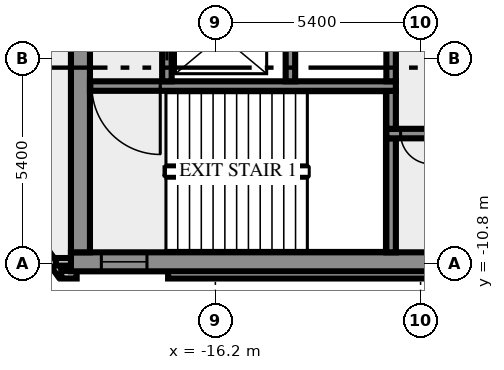
"""IFC4 building model, lengths in metres.
Left out: names, types, materials, properties, quantities, classifications, styles, units other than length and angle.
Written with IfcOpenShell. Run it as: python <this file> out.ifc"""

import sys

from ifc_helpers import new_model, si_unit, direction, frame, frame_2d, origin, place, context, subcontext, project, spatial, rectangle, extrude, element, fill, save


model = new_model("IFC4")
c1 = context("Model", 3, precision=1e-05, world=origin(), true_north=direction((0.0, 1.0)))
c2 = subcontext(c1, "Body", "Model", "MODEL_VIEW")
j1 = project(units=[si_unit("LENGTHUNIT", "METRE"), si_unit("PLANEANGLEUNIT", "RADIAN")], contexts=[c1])
p1 = place(None, origin())
s1 = spatial("IfcSite", under=j1, at=p1, CompositionType="ELEMENT")
p2 = place(p1, origin())
s2 = spatial("IfcBuilding", under=s1, at=p2, CompositionType="ELEMENT")
p3 = place(p2, frame((0.0, 0.0, 285.0)))
s3 = spatial("IfcBuildingStorey", under=s2, at=p3, CompositionType="ELEMENT", Elevation=285.0)
p4 = place(p3, frame((-21.833, -8.909, 0.0), z_axis=(0.0, 0.0, 1.0), x_axis=(0.587766567315, -0.809030569476, 0.0)))
e1 = element("IfcWall", 1, at=p4, inside=s3, PredefinedType="SOLIDWALL", context=c2, shape_type="SweptSolid", body=[
    extrude(rectangle(XDim=2.688, YDim=0.2, at=frame_2d((1.344, 0.0))), origin(), (0.0, 0.0, 1.0), 3.65),
])
p5 = place(p3, frame((-20.256, -11.088, 0.0), z_axis=(0.0, 0.0, 1.0), x_axis=(1.0, 0.0, 0.0)))
e2 = element("IfcWall", 2, at=p5, inside=s3, PredefinedType="SOLIDWALL", context=c2, shape_type="SweptSolid", body=[
    extrude(rectangle(XDim=0.406, YDim=0.2, at=frame_2d((0.203, 0.0))), origin(), (0.0, 0.0, 1.0), 3.65),
])
p6 = place(p3, frame((-17.444, -11.088, 0.0), z_axis=(0.0, 0.0, 1.0), x_axis=(1.0, 0.0, 0.0)))
e3 = element("IfcWall", 3, at=p6, inside=s3, PredefinedType="SOLIDWALL", context=c2, shape_type="SweptSolid", body=[
    extrude(rectangle(XDim=34.888, YDim=0.2, at=frame_2d((17.444, 0.0))), origin(), (0.0, 0.0, 1.0), 3.65),
])
p7 = place(p3, frame((-19.98, -10.75, 0.0), z_axis=(0.0, 0.0, 1.0), x_axis=(-1.0, 0.0, 0.0)))
e4 = element("IfcWall", 4, at=p7, inside=s3, PredefinedType="SOLIDWALL", context=c2, shape_type="SweptSolid", body=[
    extrude(rectangle(XDim=0.417, YDim=0.2, at=frame_2d((0.208, 0.0))), origin(), (0.0, 0.0, 1.0), 3.65),
])
p8 = place(p3, frame((-20.0, -10.75, 0.0), z_axis=(0.0, 0.0, 1.0), x_axis=(1.0, 0.0, 0.0)))
e5 = element("IfcWall", 5, at=p8, inside=s3, PredefinedType="SHEAR", context=c2, shape_type="SweptSolid", body=[
    extrude(rectangle(XDim=40.0, YDim=0.5, at=frame_2d((20.0, 0.0))), origin(), (0.0, 0.0, 1.0), 3.65),
])
p9 = place(p8, frame((0.8, 0.0, 1.0)))
e6 = element("IfcOpeningElement", 6, at=p9, cuts=e5, PredefinedType="OPENING", context=c2, shape_type="SweptSolid", body=[
    extrude(rectangle(XDim=1.2, YDim=1.2, at=frame_2d((0.6, 0.6))), frame((0.0, 0.26, 0.0), z_axis=(0.0, -1.0, 0.0), x_axis=(1.0, 0.0, 0.0)), (0.0, 0.0, 1.0), 0.52),
])
p10 = place(p8, frame((38.0, 0.0, 1.0)))
e7 = element("IfcOpeningElement", 7, at=p10, cuts=e5, PredefinedType="OPENING", context=c2, shape_type="SweptSolid", body=[
    extrude(rectangle(XDim=1.2, YDim=1.2, at=frame_2d((0.6, 0.6))), frame((0.0, 0.26, 0.0), z_axis=(0.0, -1.0, 0.0), x_axis=(1.0, 0.0, 0.0)), (0.0, 0.0, 1.0), 0.52),
])
p11 = place(p3, frame((-19.75, -10.5, 0.0), z_axis=(0.0, 0.0, 1.0), x_axis=(0.0, 1.0, 0.0)))
e8 = element("IfcWall", 8, at=p11, inside=s3, PredefinedType="SHEAR", context=c2, shape_type="SweptSolid", body=[
    extrude(rectangle(XDim=8.8, YDim=0.5, at=frame_2d((4.4, 0.0))), origin(), (0.0, 0.0, 1.0), 3.65),
])
p12 = place(p3, frame((-11.575, -10.5, 0.0), z_axis=(0.0, 0.0, 1.0), x_axis=(0.0, 1.0, 0.0)))
e9 = element("IfcWall", 9, at=p12, inside=s3, PredefinedType="SHEAR", context=c2, shape_type="SweptSolid", body=[
    extrude(rectangle(XDim=3.0, YDim=0.25, at=frame_2d((1.5, 0.0))), origin(), (0.0, 0.0, 1.0), 3.65),
])
p13 = place(p3, frame((11.7, -7.375, 0.0), z_axis=(0.0, 0.0, 1.0), x_axis=(-1.0, 0.0, 0.0)))
e10 = element("IfcWall", 10, at=p13, inside=s3, PredefinedType="SHEAR", context=c2, shape_type="SweptSolid", body=[
    extrude(rectangle(XDim=23.4, YDim=0.25, at=frame_2d((11.7, 0.0))), origin(), (0.0, 0.0, 1.0), 3.65),
])
p14 = place(p13, frame((22.225, 0.0, 0.0)))
e11 = element("IfcOpeningElement", 11, at=p14, cuts=e10, PredefinedType="OPENING", context=c2, shape_type="SweptSolid", body=[
    extrude(rectangle(XDim=0.8, YDim=2.1, at=frame_2d((0.4, 1.05))), frame((0.0, 0.135, 0.0), z_axis=(0.0, -1.0, 0.0), x_axis=(1.0, 0.0, 0.0)), (0.0, 0.0, 1.0), 0.27),
])
p15 = place(p13, frame((20.2, 0.0, 0.0)))
e12 = element("IfcOpeningElement", 12, at=p15, cuts=e10, PredefinedType="OPENING", context=c2, shape_type="SweptSolid", body=[
    extrude(rectangle(XDim=1.1, YDim=2.1, at=frame_2d((0.55, 1.05))), frame((0.0, 0.135, 0.0), z_axis=(0.0, -1.0, 0.0), x_axis=(1.0, 0.0, 0.0)), (0.0, 0.0, 1.0), 0.27),
])
p16 = place(p13, frame((17.7, 0.0, 0.0)))
e13 = element("IfcOpeningElement", 13, at=p16, cuts=e10, PredefinedType="OPENING", context=c2, shape_type="SweptSolid", body=[
    extrude(rectangle(XDim=1.1, YDim=2.1, at=frame_2d((0.55, 1.05))), frame((0.0, 0.135, 0.0), z_axis=(0.0, -1.0, 0.0), x_axis=(1.0, 0.0, 0.0)), (0.0, 0.0, 1.0), 0.27),
])
p17 = place(p13, frame((15.975, 0.0, 0.0)))
e14 = element("IfcOpeningElement", 14, at=p17, cuts=e10, PredefinedType="OPENING", context=c2, shape_type="SweptSolid", body=[
    extrude(rectangle(XDim=0.8, YDim=2.1, at=frame_2d((0.4, 1.05))), frame((0.0, 0.135, 0.0), z_axis=(0.0, -1.0, 0.0), x_axis=(1.0, 0.0, 0.0)), (0.0, 0.0, 1.0), 0.27),
])
p18 = place(p13, frame((14.5, 0.0, 0.0)))
e15 = element("IfcOpeningElement", 15, at=p18, cuts=e10, PredefinedType="OPENING", context=c2, shape_type="SweptSolid", body=[
    extrude(rectangle(XDim=0.9, YDim=2.1, at=frame_2d((0.45, 1.05))), frame((0.0, 0.135, 0.0), z_axis=(0.0, -1.0, 0.0), x_axis=(1.0, 0.0, 0.0)), (0.0, 0.0, 1.0), 0.27),
])
p19 = place(p13, frame((12.95, 0.0, 0.0)))
e16 = element("IfcOpeningElement", 16, at=p19, cuts=e10, PredefinedType="OPENING", context=c2, shape_type="SweptSolid", body=[
    extrude(rectangle(XDim=0.9, YDim=2.1, at=frame_2d((0.45, 1.05))), frame((0.0, 0.135, 0.0), z_axis=(0.0, -1.0, 0.0), x_axis=(1.0, 0.0, 0.0)), (0.0, 0.0, 1.0), 0.27),
])
p20 = place(p13, frame((11.475, 0.0, 0.0)))
e17 = element("IfcOpeningElement", 17, at=p20, cuts=e10, PredefinedType="OPENING", context=c2, shape_type="SweptSolid", body=[
    extrude(rectangle(XDim=0.9, YDim=2.1, at=frame_2d((0.45, 1.05))), frame((0.0, 0.135, 0.0), z_axis=(0.0, -1.0, 0.0), x_axis=(1.0, 0.0, 0.0)), (0.0, 0.0, 1.0), 0.27),
])
p21 = place(p13, frame((10.45, 0.0, 0.0)))
e18 = element("IfcOpeningElement", 18, at=p21, cuts=e10, PredefinedType="OPENING", context=c2, shape_type="SweptSolid", body=[
    extrude(rectangle(XDim=0.5, YDim=2.1, at=frame_2d((0.25, 1.05))), frame((0.0, 0.135, 0.0), z_axis=(0.0, -1.0, 0.0), x_axis=(1.0, 0.0, 0.0)), (0.0, 0.0, 1.0), 0.27),
])
p22 = place(p13, frame((7.987, 0.0, 0.0)))
e19 = element("IfcOpeningElement", 19, at=p22, cuts=e10, PredefinedType="OPENING", context=c2, shape_type="SweptSolid", body=[
    extrude(rectangle(XDim=0.9, YDim=2.1, at=frame_2d((0.45, 1.05))), frame((0.0, 0.135, 0.0), z_axis=(0.0, -1.0, 0.0), x_axis=(1.0, 0.0, 0.0)), (0.0, 0.0, 1.0), 0.27),
])
p23 = place(p13, frame((3.012, 0.0, 0.0)))
e20 = element("IfcOpeningElement", 20, at=p23, cuts=e10, PredefinedType="OPENING", context=c2, shape_type="SweptSolid", body=[
    extrude(rectangle(XDim=0.9, YDim=2.1, at=frame_2d((0.45, 1.05))), frame((0.0, 0.135, 0.0), z_axis=(0.0, -1.0, 0.0), x_axis=(1.0, 0.0, 0.0)), (0.0, 0.0, 1.0), 0.27),
])
p24 = place(p3, frame((-11.575, -7.25, 0.0), z_axis=(0.0, 0.0, 1.0), x_axis=(0.0, 1.0, 0.0)))
e21 = element("IfcWall", 21, at=p24, inside=s3, PredefinedType="SHEAR", context=c2, shape_type="SweptSolid", body=[
    extrude(rectangle(XDim=1.0, YDim=0.25, at=frame_2d((0.5, 0.0))), origin(), (0.0, 0.0, 1.0), 3.65),
])
p25 = place(p3, frame((-11.45, -6.125, 0.0), z_axis=(0.0, 0.0, 1.0), x_axis=(-1.0, 0.0, 0.0)))
e22 = element("IfcWall", 22, at=p25, inside=s3, PredefinedType="SHEAR", context=c2, shape_type="SweptSolid", body=[
    extrude(rectangle(XDim=8.05, YDim=0.25, at=frame_2d((4.025, 0.0))), origin(), (0.0, 0.0, 1.0), 3.65),
])
p26 = place(p25, frame((6.2, 0.0, 0.0)))
e23 = element("IfcOpeningElement", 23, at=p26, cuts=e22, PredefinedType="OPENING", context=c2, shape_type="SweptSolid", body=[
    extrude(rectangle(XDim=1.8, YDim=2.1, at=frame_2d((0.9, 1.05))), frame((0.0, 0.135, 0.0), z_axis=(0.0, -1.0, 0.0), x_axis=(1.0, 0.0, 0.0)), (0.0, 0.0, 1.0), 0.27),
])
p27 = place(p3, frame((-17.475, -6.0, 0.0), z_axis=(0.0, 0.0, 1.0), x_axis=(0.0, 1.0, 0.0)))
e24 = element("IfcWall", 24, at=p27, inside=s3, PredefinedType="SHEAR", context=c2, shape_type="SweptSolid", body=[
    extrude(rectangle(XDim=4.3, YDim=0.25, at=frame_2d((2.15, 0.0))), origin(), (0.0, 0.0, 1.0), 3.65),
])
p28 = place(p27, frame((0.55, 0.0, 0.0)))
e25 = element("IfcOpeningElement", 25, at=p28, cuts=e24, PredefinedType="OPENING", context=c2, shape_type="SweptSolid", body=[
    extrude(rectangle(XDim=1.3, YDim=2.1, at=frame_2d((0.65, 1.05))), frame((0.0, 0.135, 0.0), z_axis=(0.0, -1.0, 0.0), x_axis=(1.0, 0.0, 0.0)), (0.0, 0.0, 1.0), 0.27),
])
p29 = place(p3, frame((-14.225, -6.0, 0.0), z_axis=(0.0, 0.0, 1.0), x_axis=(0.0, 1.0, 0.0)))
e26 = element("IfcWall", 26, at=p29, inside=s3, PredefinedType="SHEAR", context=c2, shape_type="SweptSolid", body=[
    extrude(rectangle(XDim=4.3, YDim=0.25, at=frame_2d((2.15, 0.0))), origin(), (0.0, 0.0, 1.0), 3.65),
])
p30 = place(p3, frame((-11.575, -6.0, 0.0), z_axis=(0.0, 0.0, 1.0), x_axis=(0.0, 1.0, 0.0)))
e27 = element("IfcWall", 27, at=p30, inside=s3, PredefinedType="SHEAR", context=c2, shape_type="SweptSolid", body=[
    extrude(rectangle(XDim=1.75, YDim=0.25, at=frame_2d((0.875, 0.0))), origin(), (0.0, 0.0, 1.0), 3.65),
])
p31 = place(p9, origin())
e28 = element("IfcWindow", 28, at=p31, inside=s3, PartitioningType="SINGLE_PANEL", PredefinedType="WINDOW", context=c2, shape_type="SweptSolid", body=[
    extrude(rectangle(XDim=1.2, YDim=1.2, at=frame_2d((0.6, 0.6))), frame((0.0, 0.03, 0.0), z_axis=(0.0, -1.0, 0.0), x_axis=(1.0, 0.0, 0.0)), (0.0, 0.0, 1.0), 0.06),
])
fill(e6, e28)
p32 = place(p14, origin())
e29 = element("IfcDoor", 29, at=p32, inside=s3, OperationType="SINGLE_SWING_RIGHT", PredefinedType="DOOR", context=c2, shape_type="SweptSolid", body=[
    extrude(rectangle(XDim=0.8, YDim=2.1, at=frame_2d((0.4, 1.05))), frame((0.0, 0.025, 0.0), z_axis=(0.0, -1.0, 0.0), x_axis=(1.0, 0.0, 0.0)), (0.0, 0.0, 1.0), 0.05),
])
fill(e11, e29)
p33 = place(p26, origin())
e30 = element("IfcDoor", 30, at=p33, inside=s3, OperationType="DOUBLE_DOOR_SINGLE_SWING", PredefinedType="DOOR", context=c2, shape_type="SweptSolid", body=[
    extrude(rectangle(XDim=1.8, YDim=2.1, at=frame_2d((0.9, 1.05))), frame((0.0, 0.025, 0.0), z_axis=(0.0, -1.0, 0.0), x_axis=(1.0, 0.0, 0.0)), (0.0, 0.0, 1.0), 0.05),
])
fill(e23, e30)
p34 = place(p28, origin())
e31 = element("IfcDoor", 31, at=p34, inside=s3, OperationType="DOUBLE_DOOR_SLIDING", PredefinedType="DOOR", context=c2, shape_type="SweptSolid", body=[
    extrude(rectangle(XDim=1.3, YDim=2.1, at=frame_2d((0.65, 1.05))), frame((0.0, 0.025, 0.0), z_axis=(0.0, -1.0, 0.0), x_axis=(1.0, 0.0, 0.0)), (0.0, 0.0, 1.0), 0.05),
])
fill(e25, e31)
save(model, sys.argv[1])
